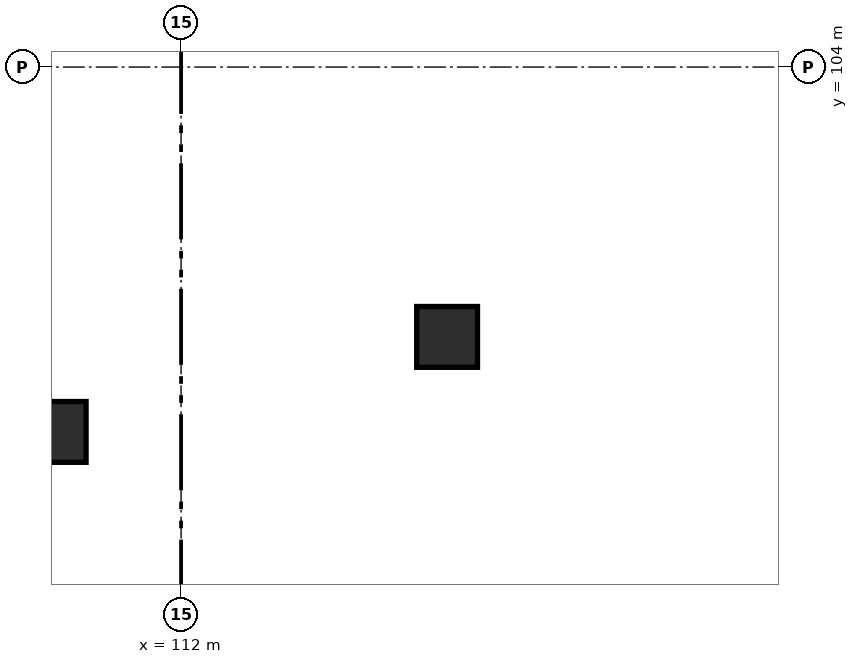
"""IFC4 building model, lengths in metres.
Left out: names, types, materials, properties, quantities, classifications, styles, units other than length and angle.
Written with IfcOpenShell. Run it as: python <this file> out.ifc"""

import sys

from ifc_helpers import new_model, si_unit, direction, frame, origin, origin_2d, place, context, subcontext, project, spatial, rectangle, extrude, element, save


model = new_model("IFC4")
c1 = context("Model", 3, precision=1e-05, world=origin(), true_north=direction((0.0, 1.0)))
c2 = subcontext(c1, "Body", "Model", "MODEL_VIEW")
j1 = project(units=[si_unit("LENGTHUNIT", "METRE"), si_unit("PLANEANGLEUNIT", "RADIAN")], contexts=[c1])
p1 = place(None, origin())
s1 = spatial("IfcSite", under=j1, at=p1, CompositionType="ELEMENT")
p2 = place(p1, origin())
s2 = spatial("IfcBuilding", under=s1, at=p2, CompositionType="ELEMENT")
p3 = place(p2, frame((0.0, 0.0, -3.84)))
s3 = spatial("IfcBuildingStorey", under=s2, at=p3, CompositionType="ELEMENT", Elevation=-3.84)
for number, where, z_axis, x_axis in (
    (1, (110.35, 99.2, 0.0), (0.0, 0.0, 1.0), (1.0, 0.0, 0.0)),
    (2, (115.5, 100.45, 0.0), (0.0, 0.0, 1.0), (1.0, 0.0, 0.0)),
):
    element("IfcColumn", number, at=place(p3, frame(where, z_axis=z_axis, x_axis=x_axis)), inside=s3, PredefinedType="COLUMN", context=c2, shape_type="SweptSolid", body=[
        extrude(rectangle(XDim=0.8, YDim=0.8, at=origin_2d()), origin(), (0.0, 0.0, 1.0), 3.84),
    ])
save(model, sys.argv[1])
